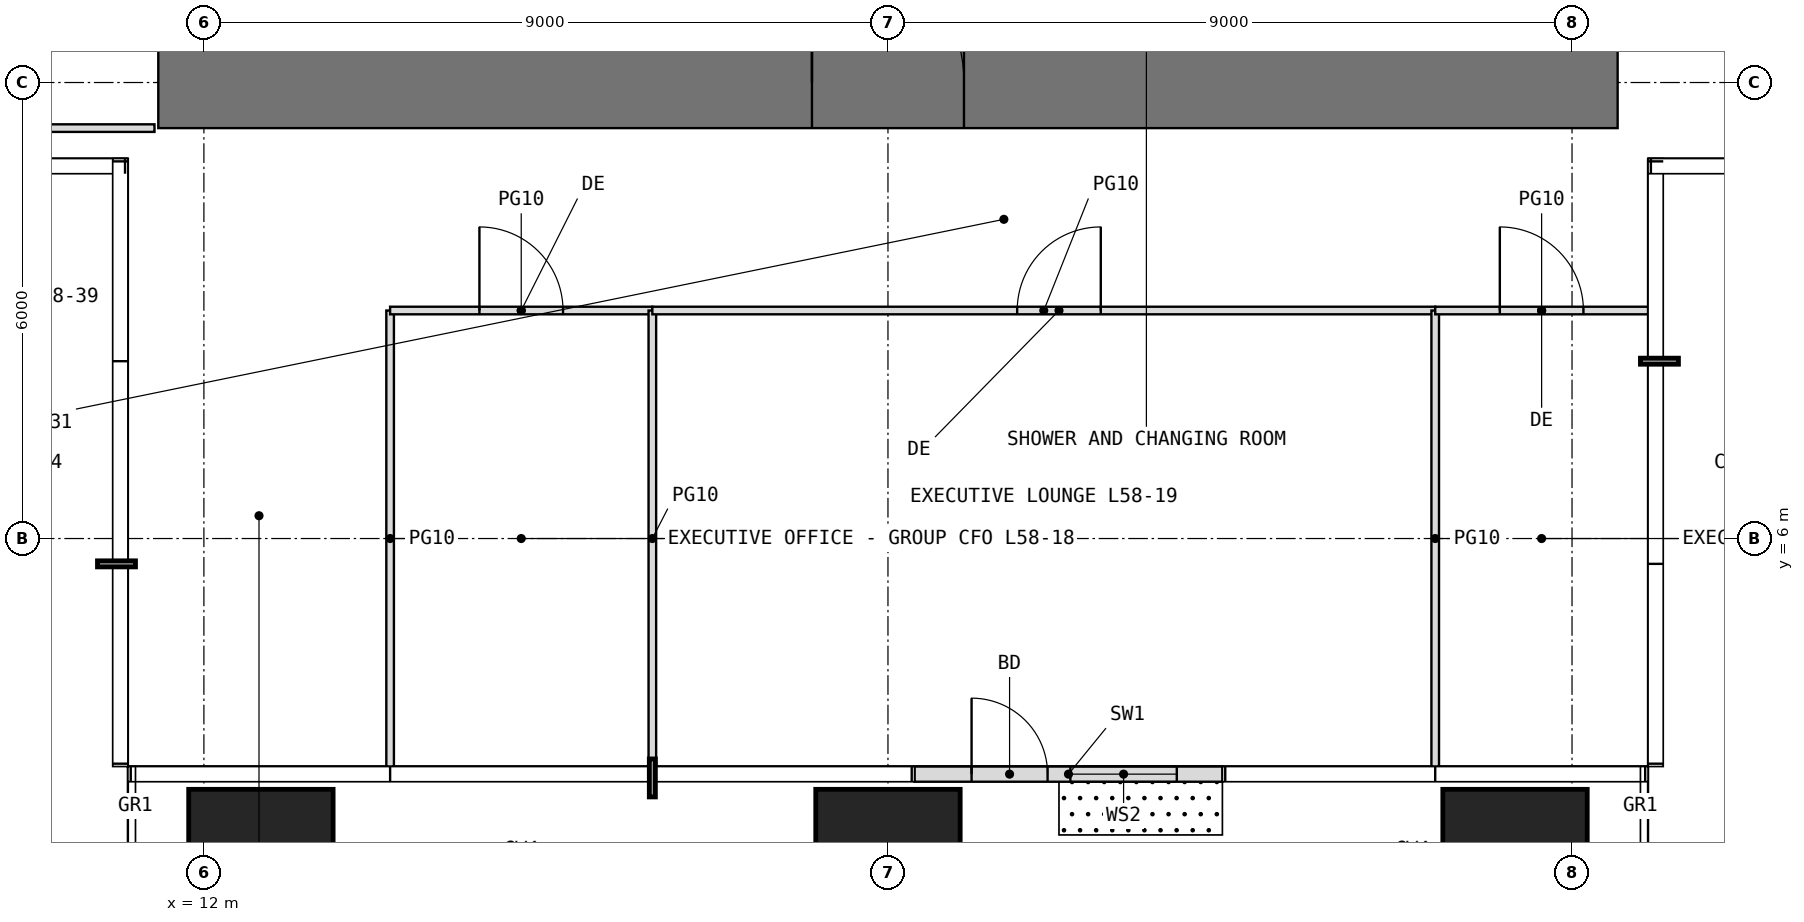
"""IFC4 building model, lengths in metres.
Left out: names, types, materials, properties, quantities, classifications, styles, units other than length and angle.
Written with IfcOpenShell. Run it as: python <this file> out.ifc"""

import sys

from ifc_helpers import new_model, si_unit, direction, frame, frame_2d, origin, origin_2d, place, context, subcontext, project, spatial, rectangle, extrude, element, fill, save


model = new_model("IFC4")
c1 = context("Model", 3, precision=1e-05, world=origin(), true_north=direction((0.0, 1.0)))
c2 = subcontext(c1, "Body", "Model", "MODEL_VIEW")
j1 = project(units=[si_unit("LENGTHUNIT", "METRE"), si_unit("PLANEANGLEUNIT", "RADIAN")], contexts=[c1])
p1 = place(None, origin())
s1 = spatial("IfcSite", under=j1, at=p1, CompositionType="ELEMENT")
p2 = place(p1, origin())
s2 = spatial("IfcBuilding", under=s1, at=p2, CompositionType="ELEMENT")
p3 = place(p2, frame((0.0, 0.0, 244.0)))
s3 = spatial("IfcBuildingStorey", under=s2, at=p3, CompositionType="ELEMENT", Elevation=244.0)
for number, where, z_axis, x_axis in (
    (1, (12.75, 1.75, 0.0), (0.0, 0.0, 1.0), (1.0, 0.0, 0.0)),
    (2, (21.0, 1.75, 0.0), (0.0, 0.0, 1.0), (1.0, 0.0, 0.0)),
    (3, (29.25, 1.75, 0.0), (0.0, 0.0, 1.0), (1.0, 0.0, 0.0)),
):
    element("IfcColumn", number, at=place(p3, frame(where, z_axis=z_axis, x_axis=x_axis)), inside=s3, PredefinedType="COLUMN", context=c2, shape_type="SweptSolid", body=[
        extrude(rectangle(XDim=1.9, YDim=1.9, at=origin_2d()), origin(), (0.0, 0.0, 1.0), 4.2),
    ])
p4 = place(p3, frame((21.35, 2.9, 0.0), z_axis=(0.0, 0.0, 1.0), x_axis=(1.0, 0.0, 0.0)))
e4 = element("IfcWall", 4, at=p4, inside=s3, PredefinedType="USERDEFINED", context=c2, shape_type="SweptSolid", body=[
    extrude(rectangle(XDim=4.05, YDim=0.2, at=frame_2d((2.025, 0.0))), origin(), (0.0, 0.0, 1.0), 3.95),
])
p5 = place(p4, frame((0.75, 0.0, 0.0)))
e5 = element("IfcOpeningElement", 5, at=p5, cuts=e4, PredefinedType="OPENING", context=c2, shape_type="SweptSolid", body=[
    extrude(rectangle(XDim=1.0, YDim=2.4, at=frame_2d((0.5, 1.2))), frame((0.0, 0.11, 0.0), z_axis=(0.0, -1.0, 0.0), x_axis=(1.0, 0.0, 0.0)), (0.0, 0.0, 1.0), 0.22),
])
p6 = place(p4, frame((2.05, 0.0, 0.3)))
e6 = element("IfcOpeningElement", 6, at=p6, cuts=e4, PredefinedType="OPENING", context=c2, shape_type="SweptSolid", body=[
    extrude(rectangle(XDim=1.4, YDim=2.7, at=frame_2d((0.7, 1.35))), frame((0.0, 0.11, 0.0), z_axis=(0.0, -1.0, 0.0), x_axis=(1.0, 0.0, 0.0)), (0.0, 0.0, 1.0), 0.22),
])
p7 = place(p3, frame((11.4, 12.0, -0.05), z_axis=(0.0, 0.0, 1.0), x_axis=(1.0, 0.0, 0.0)))
e7 = element("IfcWall", 7, at=p7, inside=s3, PredefinedType="SHEAR", context=c2, shape_type="SweptSolid", body=[
    extrude(rectangle(XDim=19.2, YDim=1.2, at=frame_2d((9.6, 0.0))), origin(), (0.0, 0.0, 1.0), 4.2),
])
p8 = place(p7, frame((8.6, 0.0, 0.05)))
e8 = element("IfcOpeningElement", 8, at=p8, cuts=e7, PredefinedType="OPENING", context=c2, shape_type="SweptSolid", body=[
    extrude(rectangle(XDim=2.0, YDim=2.2, at=frame_2d((1.0, 1.1))), frame((0.0, 0.61, 0.0), z_axis=(0.0, -1.0, 0.0), x_axis=(1.0, 0.0, 0.0)), (0.0, 0.0, 1.0), 1.22),
])
p9 = place(p3, frame((8.0, 11.4, 0.0), z_axis=(0.0, 0.0, 1.0), x_axis=(1.0, 0.0, 0.0)))
e9 = element("IfcWall", 9, at=p9, inside=s3, PredefinedType="PARTITIONING", context=c2, shape_type="SweptSolid", body=[
    extrude(rectangle(XDim=3.35, YDim=0.1, at=frame_2d((1.675, 0.0))), origin(), (0.0, 0.0, 1.0), 3.95),
])
p10 = place(p3, frame((14.45, 3.0, 0.0), z_axis=(0.0, 0.0, 1.0), x_axis=(0.0, 1.0, 0.0)))
e10 = element("IfcWall", 10, at=p10, inside=s3, PredefinedType="PARTITIONING", context=c2, shape_type="SweptSolid", body=[
    extrude(rectangle(XDim=6.0, YDim=0.1, at=frame_2d((3.0, 0.0))), origin(), (0.0, 0.0, 1.0), 3.95),
])
p11 = place(p3, frame((14.45, 9.0, 0.0), z_axis=(0.0, 0.0, 1.0), x_axis=(1.0, 0.0, 0.0)))
e11 = element("IfcWall", 11, at=p11, inside=s3, PredefinedType="PARTITIONING", context=c2, shape_type="SweptSolid", body=[
    extrude(rectangle(XDim=3.45, YDim=0.1, at=frame_2d((1.725, 0.0))), origin(), (0.0, 0.0, 1.0), 3.95),
])
p12 = place(p11, frame((1.175, 0.0, 0.0)))
e12 = element("IfcOpeningElement", 12, at=p12, cuts=e11, PredefinedType="OPENING", context=c2, shape_type="SweptSolid", body=[
    extrude(rectangle(XDim=1.1, YDim=2.3, at=frame_2d((0.55, 1.15))), frame((0.0, 0.06, 0.0), z_axis=(0.0, -1.0, 0.0), x_axis=(1.0, 0.0, 0.0)), (0.0, 0.0, 1.0), 0.12),
])
p13 = place(p3, frame((17.9, 3.0, 0.0), z_axis=(0.0, 0.0, 1.0), x_axis=(0.0, 1.0, 0.0)))
e13 = element("IfcWall", 13, at=p13, inside=s3, PredefinedType="PARTITIONING", context=c2, shape_type="SweptSolid", body=[
    extrude(rectangle(XDim=6.0, YDim=0.1, at=frame_2d((3.0, 0.0))), origin(), (0.0, 0.0, 1.0), 3.95),
])
p14 = place(p3, frame((17.9, 9.0, 0.0), z_axis=(0.0, 0.0, 1.0), x_axis=(1.0, 0.0, 0.0)))
e14 = element("IfcWall", 14, at=p14, inside=s3, PredefinedType="PARTITIONING", context=c2, shape_type="SweptSolid", body=[
    extrude(rectangle(XDim=10.3, YDim=0.1, at=frame_2d((5.15, 0.0))), origin(), (0.0, 0.0, 1.0), 3.95),
])
p15 = place(p14, frame((4.8, 0.0, 0.0)))
e15 = element("IfcOpeningElement", 15, at=p15, cuts=e14, PredefinedType="OPENING", context=c2, shape_type="SweptSolid", body=[
    extrude(rectangle(XDim=1.1, YDim=2.3, at=frame_2d((0.55, 1.15))), frame((0.0, 0.06, 0.0), z_axis=(0.0, -1.0, 0.0), x_axis=(1.0, 0.0, 0.0)), (0.0, 0.0, 1.0), 0.12),
])
p16 = place(p3, frame((28.2, 3.0, 0.0), z_axis=(0.0, 0.0, 1.0), x_axis=(0.0, 1.0, 0.0)))
e16 = element("IfcWall", 16, at=p16, inside=s3, PredefinedType="PARTITIONING", context=c2, shape_type="SweptSolid", body=[
    extrude(rectangle(XDim=6.0, YDim=0.1, at=frame_2d((3.0, 0.0))), origin(), (0.0, 0.0, 1.0), 3.95),
])
p17 = place(p3, frame((28.2, 9.0, 0.0), z_axis=(0.0, 0.0, 1.0), x_axis=(1.0, 0.0, 0.0)))
e17 = element("IfcWall", 17, at=p17, inside=s3, PredefinedType="PARTITIONING", context=c2, shape_type="SweptSolid", body=[
    extrude(rectangle(XDim=2.8, YDim=0.1, at=frame_2d((1.4, 0.0))), origin(), (0.0, 0.0, 1.0), 3.95),
])
p18 = place(p17, frame((0.85, 0.0, 0.0)))
e18 = element("IfcOpeningElement", 18, at=p18, cuts=e17, PredefinedType="OPENING", context=c2, shape_type="SweptSolid", body=[
    extrude(rectangle(XDim=1.1, YDim=2.3, at=frame_2d((0.55, 1.15))), frame((0.0, 0.06, 0.0), z_axis=(0.0, -1.0, 0.0), x_axis=(1.0, 0.0, 0.0)), (0.0, 0.0, 1.0), 0.12),
])
p19 = place(p5, origin())
e19 = element("IfcDoor", 19, at=p19, inside=s3, OperationType="SINGLE_SWING_LEFT", PredefinedType="DOOR", context=c2, shape_type="SweptSolid", body=[
    extrude(rectangle(XDim=1.0, YDim=2.4, at=frame_2d((0.5, 1.2))), frame((0.0, 0.025, 0.0), z_axis=(0.0, -1.0, 0.0), x_axis=(1.0, 0.0, 0.0)), (0.0, 0.0, 1.0), 0.05),
])
fill(e5, e19)
p20 = place(p6, origin())
e20 = element("IfcWindow", 20, at=p20, inside=s3, PartitioningType="SINGLE_PANEL", PredefinedType="WINDOW", context=c2, shape_type="SweptSolid", body=[
    extrude(rectangle(XDim=1.4, YDim=2.7, at=frame_2d((0.7, 1.35))), frame((0.0, 0.03, 0.0), z_axis=(0.0, -1.0, 0.0), x_axis=(1.0, 0.0, 0.0)), (0.0, 0.0, 1.0), 0.06),
])
fill(e6, e20)
p21 = place(p8, origin())
e21 = element("IfcDoor", 21, at=p21, inside=s3, OperationType="DOUBLE_DOOR_SINGLE_SWING", PredefinedType="DOOR", context=c2, shape_type="SweptSolid", body=[
    extrude(rectangle(XDim=2.0, YDim=2.2, at=frame_2d((1.0, 1.1))), frame((0.0, 0.025, 0.0), z_axis=(0.0, -1.0, 0.0), x_axis=(1.0, 0.0, 0.0)), (0.0, 0.0, 1.0), 0.05),
])
fill(e8, e21)
p22 = place(p12, origin())
e22 = element("IfcDoor", 22, at=p22, inside=s3, OperationType="SINGLE_SWING_LEFT", PredefinedType="DOOR", context=c2, shape_type="SweptSolid", body=[
    extrude(rectangle(XDim=1.1, YDim=2.3, at=frame_2d((0.55, 1.15))), frame((0.0, 0.025, 0.0), z_axis=(0.0, -1.0, 0.0), x_axis=(1.0, 0.0, 0.0)), (0.0, 0.0, 1.0), 0.05),
])
fill(e12, e22)
p23 = place(p15, origin())
e23 = element("IfcDoor", 23, at=p23, inside=s3, OperationType="SINGLE_SWING_RIGHT", PredefinedType="DOOR", context=c2, shape_type="SweptSolid", body=[
    extrude(rectangle(XDim=1.1, YDim=2.3, at=frame_2d((0.55, 1.15))), frame((0.0, 0.025, 0.0), z_axis=(0.0, -1.0, 0.0), x_axis=(1.0, 0.0, 0.0)), (0.0, 0.0, 1.0), 0.05),
])
fill(e15, e23)
p24 = place(p18, origin())
e24 = element("IfcDoor", 24, at=p24, inside=s3, OperationType="SINGLE_SWING_LEFT", PredefinedType="DOOR", context=c2, shape_type="SweptSolid", body=[
    extrude(rectangle(XDim=1.1, YDim=2.3, at=frame_2d((0.55, 1.15))), frame((0.0, 0.025, 0.0), z_axis=(0.0, -1.0, 0.0), x_axis=(1.0, 0.0, 0.0)), (0.0, 0.0, 1.0), 0.05),
])
fill(e18, e24)
save(model, sys.argv[1])
